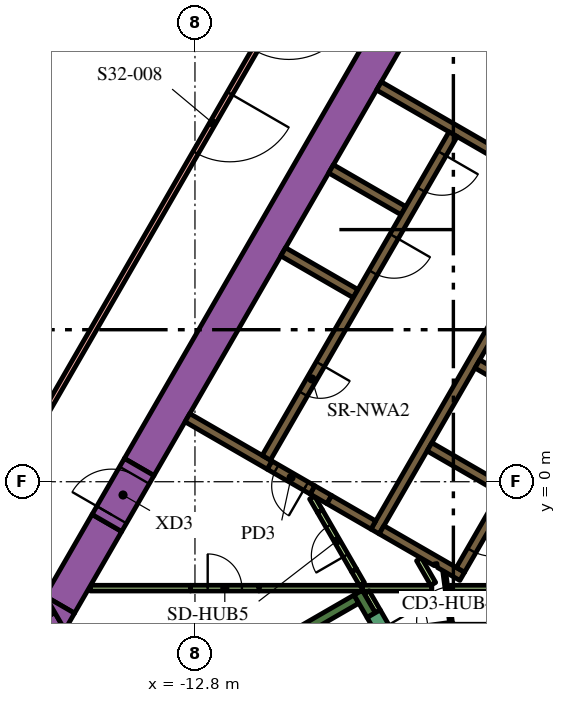
"""IFC4 building model, lengths in metres.
Left out: names, types, materials, properties, quantities, classifications, styles, units other than length and angle.
Written with IfcOpenShell. Run it as: python <this file> out.ifc"""

import sys

from ifc_helpers import new_model, si_unit, direction, frame, frame_2d, origin, place, context, subcontext, project, spatial, polyline, rectangle, outline, extrude, element, fill, save


model = new_model("IFC4")
c1 = context("Model", 3, precision=1e-05, world=origin(), true_north=direction((0.0, 1.0)))
c2 = subcontext(c1, "Body", "Model", "MODEL_VIEW")
j1 = project(units=[si_unit("LENGTHUNIT", "METRE"), si_unit("PLANEANGLEUNIT", "RADIAN")], contexts=[c1])
p1 = place(None, origin())
s1 = spatial("IfcSite", under=j1, at=p1, CompositionType="ELEMENT")
p2 = place(p1, origin())
s2 = spatial("IfcBuilding", under=s1, at=p2, CompositionType="ELEMENT")
p3 = place(p2, frame((0.0, 0.0, 134.4)))
s3 = spatial("IfcBuildingStorey", under=s2, at=p3, CompositionType="ELEMENT", Elevation=134.4)
p4 = place(p3, frame((-14.268, 0.387, 0.0), z_axis=(0.0, 0.0, 1.0), x_axis=(0.499994617707, 0.866028511231, 0.0)))
e1 = element("IfcWall", 1, at=p4, inside=s3, PredefinedType="SOLIDWALL", context=c2, shape_type="SweptSolid", body=[
    extrude(rectangle(XDim=18.817, YDim=0.9, at=frame_2d((9.409, 0.0))), origin(), (0.0, 0.0, 1.0), 7.2),
])
p5 = place(p3, frame((-12.134, -11.883, 0.0), z_axis=(0.0, 0.0, 1.0), x_axis=(-0.500005339912, 0.866022320763, 0.0)))
e2 = element("IfcWall", 2, at=p5, inside=s3, PredefinedType="SOLIDWALL", context=c2, shape_type="SweptSolid", body=[
    extrude(rectangle(XDim=9.488, YDim=0.9, at=frame_2d((4.744, 0.0))), origin(), (0.0, 0.0, 1.0), 7.2),
])
p6 = place(p3, origin())
e3 = element("IfcWall", 3, at=p6, inside=s3, PredefinedType="SOLIDWALL", context=c2, shape_type="SweptSolid", body=[
    extrude(outline(polyline([(-16.489, -3.44), (-17.251, -3.88), (-16.743, -3.0), (-16.489, -3.44)])), origin(), (0.0, 0.0, 1.0), 7.2),
])
p7 = place(p3, frame((-15.118, -1.085, 0.0), z_axis=(0.0, 0.0, 1.0), x_axis=(-0.50006606081, -0.865987260198, 0.0)))
e4 = element("IfcWall", 4, at=p7, inside=s3, PredefinedType="SOLIDWALL", context=c2, shape_type="SweptSolid", body=[
    extrude(rectangle(XDim=2.481, YDim=0.9, at=frame_2d((1.24, 0.0))), origin(), (0.0, 0.0, 1.0), 7.2),
])
e5 = element("IfcWall", 5, at=p6, inside=s3, PredefinedType="SOLIDWALL", context=c2, shape_type="SweptSolid", body=[
    extrude(outline(polyline([(-16.223, -3.9), (-16.732, -3.02), (-15.969, -3.46), (-16.223, -3.9)])), origin(), (0.0, 0.0, 1.0), 7.2),
])
p8 = place(p3, frame((-14.44, -6.49, 0.0), z_axis=(0.0, 0.0, 1.0), x_axis=(0.866022966069, 0.500004222222, 0.0)))
e6 = element("IfcWall", 6, at=p8, inside=s3, PredefinedType="SOLIDWALL", context=c2, shape_type="SweptSolid", body=[
    extrude(rectangle(XDim=6.8, YDim=0.25, at=frame_2d((3.4, 0.0))), origin(), (0.0, 0.0, 1.0), 7.2),
])
p9 = place(p3, frame((-8.163, -3.511, 0.0), z_axis=(0.0, 0.0, 1.0), x_axis=(-0.500206266495, 0.865906283012, 0.0)))
e7 = element("IfcWall", 7, at=p9, inside=s3, PredefinedType="SOLIDWALL", context=c2, shape_type="SweptSolid", body=[
    extrude(rectangle(XDim=0.684, YDim=0.25, at=frame_2d((0.342, 0.0))), origin(), (0.0, 0.0, 1.0), 7.2),
])
p10 = place(p3, frame((-8.06, -1.311, 0.0), z_axis=(0.0, 0.0, 1.0), x_axis=(0.50000273126, 0.866023826885, 0.0)))
e8 = element("IfcWall", 8, at=p10, inside=s3, PredefinedType="SOLIDWALL", context=c2, shape_type="SweptSolid", body=[
    extrude(rectangle(XDim=10.33, YDim=0.25, at=frame_2d((5.165, 0.0))), origin(), (0.0, 0.0, 1.0), 7.2),
])
for number, where, z_axis, x_axis in (
    (9, (-5.369, 3.1, 0.0), (0.0, 0.0, 1.0), (0.866, -0.5, 0.0)),
    (10, (-4.724, -0.182, 0.0), (0.0, 0.0, 1.0), (-0.866, 0.5, 0.0)),
):
    element("IfcWall", number, at=place(p3, frame(where, z_axis=z_axis, x_axis=x_axis)), inside=s3, PredefinedType="SOLIDWALL", context=c2, shape_type="SweptSolid", body=[
        extrude(rectangle(XDim=2.2, YDim=0.25, at=frame_2d((1.1, 0.0))), origin(), (0.0, 0.0, 1.0), 7.2),
    ])
e11 = element("IfcWall", 11, at=p6, inside=s3, PredefinedType="SOLIDWALL", context=c2, shape_type="SweptSolid", body=[
    extrude(outline(polyline([(-5.922, -2.257), (-5.922, -2.257), (-5.705, -2.382), (-5.83, -2.598), (-6.418, -2.258), (-6.433, -2.153), (-6.433, -2.153), (-6.433, -2.153), (-6.508, -2.163), (-6.508, -2.163), (-6.508, -2.163), (-6.501, -2.21), (-7.952, -1.373), (-7.827, -1.156), (-5.922, -2.257)])), origin(), (0.0, 0.0, 1.0), 7.2),
])
p11 = place(p3, frame((-9.708, -0.215, 0.0), z_axis=(0.0, 0.0, 1.0), x_axis=(0.866113839764, -0.499846793097, 0.0)))
e12 = element("IfcWall", 12, at=p11, inside=s3, PredefinedType="SOLIDWALL", context=c2, shape_type="SweptSolid", body=[
    extrude(rectangle(XDim=0.51, YDim=0.25, at=frame_2d((0.255, 0.0))), origin(), (0.0, 0.0, 1.0), 7.2),
])
p12 = place(p3, frame((-12.999, 1.685, 0.0), z_axis=(0.0, 0.0, 1.0), x_axis=(0.865996765544, -0.500049599607, 0.0)))
e13 = element("IfcWall", 13, at=p12, inside=s3, PredefinedType="SOLIDWALL", context=c2, shape_type="SweptSolid", body=[
    extrude(rectangle(XDim=2.498, YDim=0.25, at=frame_2d((1.249, 0.0))), origin(), (0.0, 0.0, 1.0), 7.2),
])
p13 = place(p3, frame((-9.265, -0.471, 0.0), z_axis=(0.0, 0.0, 1.0), x_axis=(0.865954634268, -0.500122556369, 0.0)))
e14 = element("IfcWall", 14, at=p13, inside=s3, PredefinedType="SOLIDWALL", context=c2, shape_type="SweptSolid", body=[
    extrude(rectangle(XDim=1.338, YDim=0.25, at=frame_2d((0.669, 0.0))), origin(), (0.0, 0.0, 1.0), 7.2),
])
for number, where, z_axis, x_axis in (
    (15, (-8.574, 4.95, 0.0), (0.0, 0.0, 1.0), (-0.866, 0.5, 0.0)),
    (16, (-7.314, 7.132, 0.0), (0.0, 0.0, 1.0), (-0.866, 0.5, 0.0)),
):
    element("IfcWall", number, at=place(p3, frame(where, z_axis=z_axis, x_axis=x_axis)), inside=s3, PredefinedType="SOLIDWALL", context=c2, shape_type="SweptSolid", body=[
        extrude(rectangle(XDim=2.2, YDim=0.25, at=frame_2d((1.1, 0.0))), origin(), (0.0, 0.0, 1.0), 7.2),
    ])
p14 = place(p3, frame((-7.959, 10.415, 0.0), z_axis=(0.0, 0.0, 1.0), x_axis=(0.866020958405, -0.500007699544, 0.0)))
e17 = element("IfcWall", 17, at=p14, inside=s3, PredefinedType="SOLIDWALL", context=c2, shape_type="SweptSolid", body=[
    extrude(rectangle(XDim=4.1, YDim=0.25, at=frame_2d((2.05, 0.0))), origin(), (0.0, 0.0, 1.0), 7.2),
])
p15 = place(p3, frame((-12.915, -2.8, 0.0), z_axis=(0.0, 0.0, 1.0), x_axis=(-1.0, 0.0, 0.0)))
e18 = element("IfcWall", 18, at=p15, inside=s3, PredefinedType="PARTITIONING", context=c2, shape_type="SweptSolid", body=[
    extrude(rectangle(XDim=2.637, YDim=0.15, at=frame_2d((1.318, 0.0))), origin(), (0.0, 0.0, 1.0), 6.15),
])
p16 = place(p3, frame((-8.395, -2.8, 0.0), z_axis=(0.0, 0.0, 1.0), x_axis=(1.0, 0.0, 0.0)))
e19 = element("IfcWall", 19, at=p16, inside=s3, PredefinedType="PARTITIONING", context=c2, shape_type="SweptSolid", body=[
    extrude(rectangle(XDim=1.828, YDim=0.15, at=frame_2d((0.914, 0.0))), origin(), (0.0, 0.0, 1.0), 6.15),
])
p17 = place(p3, frame((-11.115, -2.8, 0.0), z_axis=(0.0, 0.0, 1.0), x_axis=(1.0, 0.0, 0.0)))
e20 = element("IfcWall", 20, at=p17, inside=s3, PredefinedType="PARTITIONING", context=c2, shape_type="SweptSolid", body=[
    extrude(rectangle(XDim=2.708, YDim=0.15, at=frame_2d((1.354, 0.0))), origin(), (0.0, 0.0, 1.0), 6.15),
])
p18 = place(p3, frame((-6.531, -2.689, 0.0), z_axis=(0.0, 0.0, 1.0), x_axis=(-0.499967446111, 0.866044197965, 0.0)))
e21 = element("IfcWall", 21, at=p18, inside=s3, PredefinedType="PARTITIONING", context=c2, shape_type="SweptSolid", body=[
    extrude(rectangle(XDim=0.748, YDim=0.15, at=frame_2d((0.374, 0.0))), origin(), (0.0, 0.0, 1.0), 6.15),
])
p19 = place(p3, frame((-7.99, -3.412, 0.0), z_axis=(0.0, 0.0, 1.0), x_axis=(-0.500193841991, 0.86591346013, 0.0)))
e22 = element("IfcWall", 22, at=p19, inside=s3, PredefinedType="PARTITIONING", context=c2, shape_type="SweptSolid", body=[
    extrude(rectangle(XDim=0.583, YDim=0.15, at=frame_2d((0.292, 0.0))), origin(), (0.0, 0.0, 1.0), 6.15),
])
p20 = place(p3, frame((-8.612, -2.333, 0.0), z_axis=(0.0, 0.0, 1.0), x_axis=(0.500248216681, -0.86588204838, 0.0)))
e23 = element("IfcWall", 23, at=p20, inside=s3, PredefinedType="PARTITIONING", context=c2, shape_type="SweptSolid", body=[
    extrude(rectangle(XDim=0.415, YDim=0.15, at=frame_2d((0.208, 0.0))), origin(), (0.0, 0.0, 1.0), 6.15),
])
p21 = place(p3, frame((-6.086, -2.801, 0.0), z_axis=(0.0, 0.0, 1.0), x_axis=(1.0, 0.0, 0.0)))
e24 = element("IfcWall", 24, at=p21, inside=s3, PredefinedType="PARTITIONING", context=c2, shape_type="SweptSolid", body=[
    extrude(rectangle(XDim=7.524, YDim=0.15, at=frame_2d((3.762, 0.0))), origin(), (0.0, 0.0, 1.0), 6.15),
])
p22 = place(p3, frame((-9.512, -0.775, 0.0), z_axis=(0.0, 0.0, 1.0), x_axis=(-0.500080620599, 0.865978852456, 0.0)))
e25 = element("IfcWall", 25, at=p22, inside=s3, PredefinedType="PARTITIONING", context=c2, shape_type="SweptSolid", body=[
    extrude(rectangle(XDim=0.413, YDim=0.15, at=frame_2d((0.207, 0.0))), origin(), (0.0, 0.0, 1.0), 6.15),
])
p23 = place(p3, frame((-6.008, 9.144, 0.0), z_axis=(0.0, 0.0, 1.0), x_axis=(-0.500006956611, -0.866021387346, 0.0)))
e26 = element("IfcWall", 26, at=p23, inside=s3, PredefinedType="SOLIDWALL", context=c2, shape_type="SweptSolid", body=[
    extrude(rectangle(XDim=9.83, YDim=0.25, at=frame_2d((4.915, 0.0))), origin(), (0.0, 0.0, 1.0), 7.2),
])
p24 = place(p23, frame((0.585, 0.0, 0.0)))
e27 = element("IfcOpeningElement", 27, at=p24, cuts=e26, PredefinedType="OPENING", context=c2, shape_type="SweptSolid", body=[
    extrude(rectangle(XDim=1.1, YDim=2.1, at=frame_2d((0.55, 1.05))), frame((0.0, 0.135, 0.0), z_axis=(0.0, -1.0, 0.0), x_axis=(1.0, 0.0, 0.0)), (0.0, 0.0, 1.0), 0.27),
])
p25 = place(p23, frame((3.105, 0.0, 0.0)))
e28 = element("IfcOpeningElement", 28, at=p25, cuts=e26, PredefinedType="OPENING", context=c2, shape_type="SweptSolid", body=[
    extrude(rectangle(XDim=1.1, YDim=2.1, at=frame_2d((0.55, 1.05))), frame((0.0, 0.135, 0.0), z_axis=(0.0, -1.0, 0.0), x_axis=(1.0, 0.0, 0.0)), (0.0, 0.0, 1.0), 0.27),
])
p26 = place(p23, frame((6.985, 0.0, 0.0)))
e29 = element("IfcOpeningElement", 29, at=p26, cuts=e26, PredefinedType="OPENING", context=c2, shape_type="SweptSolid", body=[
    extrude(rectangle(XDim=0.9, YDim=2.1, at=frame_2d((0.45, 1.05))), frame((0.0, 0.135, 0.0), z_axis=(0.0, -1.0, 0.0), x_axis=(1.0, 0.0, 0.0)), (0.0, 0.0, 1.0), 0.27),
])
p27 = place(p3, frame((-0.898, 6.194, 0.0), z_axis=(0.0, 0.0, 1.0), x_axis=(-0.499996202215, -0.866027596426, 0.0)))
e30 = element("IfcWall", 30, at=p27, inside=s3, PredefinedType="SOLIDWALL", context=c2, shape_type="SweptSolid", body=[
    extrude(rectangle(XDim=9.83, YDim=0.25, at=frame_2d((4.915, 0.0))), origin(), (0.0, 0.0, 1.0), 7.2),
])
p28 = place(p27, frame((0.585, 0.0, 0.0)))
e31 = element("IfcOpeningElement", 31, at=p28, cuts=e30, PredefinedType="OPENING", context=c2, shape_type="SweptSolid", body=[
    extrude(rectangle(XDim=1.1, YDim=2.1, at=frame_2d((0.55, 1.05))), frame((0.0, 0.135, 0.0), z_axis=(0.0, -1.0, 0.0), x_axis=(1.0, 0.0, 0.0)), (0.0, 0.0, 1.0), 0.27),
])
p29 = place(p27, frame((3.105, 0.0, 0.0)))
e32 = element("IfcOpeningElement", 32, at=p29, cuts=e30, PredefinedType="OPENING", context=c2, shape_type="SweptSolid", body=[
    extrude(rectangle(XDim=1.1, YDim=2.1, at=frame_2d((0.55, 1.05))), frame((0.0, 0.135, 0.0), z_axis=(0.0, -1.0, 0.0), x_axis=(1.0, 0.0, 0.0)), (0.0, 0.0, 1.0), 0.27),
])
p30 = place(p27, frame((5.625, 0.0, 0.0)))
e33 = element("IfcOpeningElement", 33, at=p30, cuts=e30, PredefinedType="OPENING", context=c2, shape_type="SweptSolid", body=[
    extrude(rectangle(XDim=1.1, YDim=2.1, at=frame_2d((0.55, 1.05))), frame((0.0, 0.135, 0.0), z_axis=(0.0, -1.0, 0.0), x_axis=(1.0, 0.0, 0.0)), (0.0, 0.0, 1.0), 0.27),
])
p31 = place(p27, frame((8.145, 0.0, 0.0)))
e34 = element("IfcOpeningElement", 34, at=p31, cuts=e30, PredefinedType="OPENING", context=c2, shape_type="SweptSolid", body=[
    extrude(rectangle(XDim=1.1, YDim=2.1, at=frame_2d((0.55, 1.05))), frame((0.0, 0.135, 0.0), z_axis=(0.0, -1.0, 0.0), x_axis=(1.0, 0.0, 0.0)), (0.0, 0.0, 1.0), 0.27),
])
p32 = place(p3, frame((-8.098, -3.474, 0.0), z_axis=(0.0, 0.0, 1.0), x_axis=(0.49994051562, -0.866059744384, 0.0)))
e35 = element("IfcWall", 35, at=p32, inside=s3, PredefinedType="SOLIDWALL", context=c2, shape_type="SweptSolid", body=[
    extrude(rectangle(XDim=2.1, YDim=0.4, at=frame_2d((1.05, 0.0))), origin(), (0.0, 0.0, 1.0), 7.2),
])
p33 = place(p32, frame((0.45, 0.0, 0.0)))
e36 = element("IfcOpeningElement", 36, at=p33, cuts=e35, PredefinedType="OPENING", context=c2, shape_type="SweptSolid", body=[
    extrude(rectangle(XDim=1.2, YDim=2.1, at=frame_2d((0.6, 1.05))), frame((0.0, 0.21, 0.0), z_axis=(0.0, -1.0, 0.0), x_axis=(1.0, 0.0, 0.0)), (0.0, 0.0, 1.0), 0.42),
])
p34 = place(p3, frame((-9.708, -0.215, 0.0), z_axis=(0.0, 0.0, 1.0), x_axis=(-0.866004217611, 0.500036693733, 0.0)))
e37 = element("IfcWall", 37, at=p34, inside=s3, PredefinedType="SOLIDWALL", context=c2, shape_type="SweptSolid", body=[
    extrude(rectangle(XDim=1.3, YDim=0.25, at=frame_2d((0.65, 0.0))), origin(), (0.0, 0.0, 1.0), 7.2),
])
p35 = place(p34, frame((0.2, 0.0, 0.0)))
e38 = element("IfcOpeningElement", 38, at=p35, cuts=e37, PredefinedType="OPENING", context=c2, shape_type="SweptSolid", body=[
    extrude(rectangle(XDim=0.9, YDim=2.1, at=frame_2d((0.45, 1.05))), frame((0.0, 0.135, 0.0), z_axis=(0.0, -1.0, 0.0), x_axis=(1.0, 0.0, 0.0)), (0.0, 0.0, 1.0), 0.27),
])
p36 = place(p3, frame((-5.995, -4.213, 0.0), z_axis=(0.0, 0.0, 1.0), x_axis=(-0.132072335448, 0.991240081014, 0.0)))
e39 = element("IfcWall", 39, at=p36, inside=s3, PredefinedType="PARTITIONING", context=c2, shape_type="SweptSolid", body=[
    extrude(rectangle(XDim=2.1, YDim=0.076, at=frame_2d((1.05, 0.0))), origin(), (0.0, 0.0, 1.0), 6.15),
])
p37 = place(p36, frame((0.55, 0.0, 0.0)))
e40 = element("IfcOpeningElement", 40, at=p37, cuts=e39, PredefinedType="OPENING", context=c2, shape_type="SweptSolid", body=[
    extrude(rectangle(XDim=0.9, YDim=2.1, at=frame_2d((0.45, 1.05))), frame((0.0, 0.048, 0.0), z_axis=(0.0, -1.0, 0.0), x_axis=(1.0, 0.0, 0.0)), (0.0, 0.0, 1.0), 0.096),
])
p38 = place(p3, frame((-15.118, -1.085, 0.0), z_axis=(0.0, 0.0, 1.0), x_axis=(0.500000056704, 0.866025371046, 0.0)))
e41 = element("IfcWall", 41, at=p38, inside=s3, PredefinedType="SOLIDWALL", context=c2, shape_type="SweptSolid", body=[
    extrude(rectangle(XDim=1.7, YDim=0.9, at=frame_2d((0.85, 0.0))), origin(), (0.0, 0.0, 1.0), 7.2),
])
p39 = place(p38, frame((0.25, 0.0, 0.0)))
e42 = element("IfcOpeningElement", 42, at=p39, cuts=e41, PredefinedType="OPENING", context=c2, shape_type="SweptSolid", body=[
    extrude(rectangle(XDim=1.2, YDim=2.1, at=frame_2d((0.6, 1.05))), frame((0.0, 0.46, 0.0), z_axis=(0.0, -1.0, 0.0), x_axis=(1.0, 0.0, 0.0)), (0.0, 0.0, 1.0), 0.92),
])
p40 = place(p3, frame((-12.915, -2.8, 0.0), z_axis=(0.0, 0.0, 1.0), x_axis=(1.0, 0.0, 0.0)))
e43 = element("IfcWall", 43, at=p40, inside=s3, PredefinedType="PARTITIONING", context=c2, shape_type="SweptSolid", body=[
    extrude(rectangle(XDim=1.8, YDim=0.15, at=frame_2d((0.9, 0.0))), origin(), (0.0, 0.0, 1.0), 6.15),
])
p41 = place(p40, frame((0.45, 0.0, 0.0)))
e44 = element("IfcOpeningElement", 44, at=p41, cuts=e43, PredefinedType="OPENING", context=c2, shape_type="SweptSolid", body=[
    extrude(rectangle(XDim=0.9, YDim=2.1, at=frame_2d((0.45, 1.05))), frame((0.0, 0.085, 0.0), z_axis=(0.0, -1.0, 0.0), x_axis=(1.0, 0.0, 0.0)), (0.0, 0.0, 1.0), 0.17),
])
p42 = place(p3, frame((-8.612, -2.333, 0.0), z_axis=(0.0, 0.0, 1.0), x_axis=(-0.499961193289, 0.866047807691, 0.0)))
e45 = element("IfcWall", 45, at=p42, inside=s3, PredefinedType="PARTITIONING", context=c2, shape_type="SweptSolid", body=[
    extrude(rectangle(XDim=1.8, YDim=0.15, at=frame_2d((0.9, 0.0))), origin(), (0.0, 0.0, 1.0), 6.15),
])
p43 = place(p42, frame((0.45, 0.0, 0.0)))
e46 = element("IfcOpeningElement", 46, at=p43, cuts=e45, PredefinedType="OPENING", context=c2, shape_type="SweptSolid", body=[
    extrude(rectangle(XDim=0.9, YDim=2.1, at=frame_2d((0.45, 1.05))), frame((0.0, 0.085, 0.0), z_axis=(0.0, -1.0, 0.0), x_axis=(1.0, 0.0, 0.0)), (0.0, 0.0, 1.0), 0.17),
])
p44 = place(p3, frame((-6.639, 19.3, 0.0), z_axis=(0.0, 0.0, 1.0), x_axis=(-0.500001456469, -0.86602456289, 0.0)))
e47 = element("IfcWall", 47, at=p44, inside=s3, PredefinedType="PARTITIONING", context=c2, shape_type="SweptSolid", body=[
    extrude(rectangle(XDim=22.774, YDim=0.15, at=frame_2d((11.387, 0.0))), origin(), (0.0, 0.0, 1.0), 6.15),
])
p45 = place(p44, frame((10.487, 0.0, 0.0)))
e48 = element("IfcOpeningElement", 48, at=p45, cuts=e47, PredefinedType="OPENING", context=c2, shape_type="SweptSolid", body=[
    extrude(rectangle(XDim=1.8, YDim=2.1, at=frame_2d((0.9, 1.05))), frame((0.0, 0.085, 0.0), z_axis=(0.0, -1.0, 0.0), x_axis=(1.0, 0.0, 0.0)), (0.0, 0.0, 1.0), 0.17),
])
p46 = place(p44, frame((7.377, 0.0, 0.0)))
e49 = element("IfcOpeningElement", 49, at=p46, cuts=e47, PredefinedType="OPENING", context=c2, shape_type="SweptSolid", body=[
    extrude(rectangle(XDim=1.8, YDim=2.1, at=frame_2d((0.9, 1.05))), frame((0.0, 0.085, 0.0), z_axis=(0.0, -1.0, 0.0), x_axis=(1.0, 0.0, 0.0)), (0.0, 0.0, 1.0), 0.17),
])
p47 = place(p24, origin())
e50 = element("IfcDoor", 50, at=p47, inside=s3, OperationType="DOUBLE_DOOR_SLIDING", PredefinedType="DOOR", context=c2, shape_type="SweptSolid", body=[
    extrude(rectangle(XDim=1.1, YDim=2.1, at=frame_2d((0.55, 1.05))), frame((0.0, 0.025, 0.0), z_axis=(0.0, -1.0, 0.0), x_axis=(1.0, 0.0, 0.0)), (0.0, 0.0, 1.0), 0.05),
])
fill(e27, e50)
p48 = place(p25, origin())
e51 = element("IfcDoor", 51, at=p48, inside=s3, OperationType="DOUBLE_DOOR_SLIDING", PredefinedType="DOOR", context=c2, shape_type="SweptSolid", body=[
    extrude(rectangle(XDim=1.1, YDim=2.1, at=frame_2d((0.55, 1.05))), frame((0.0, 0.025, 0.0), z_axis=(0.0, -1.0, 0.0), x_axis=(1.0, 0.0, 0.0)), (0.0, 0.0, 1.0), 0.05),
])
fill(e28, e51)
p49 = place(p26, origin())
e52 = element("IfcDoor", 52, at=p49, inside=s3, OperationType="SINGLE_SWING_LEFT", PredefinedType="DOOR", context=c2, shape_type="SweptSolid", body=[
    extrude(rectangle(XDim=0.9, YDim=2.1, at=frame_2d((0.45, 1.05))), frame((0.0, 0.025, 0.0), z_axis=(0.0, -1.0, 0.0), x_axis=(1.0, 0.0, 0.0)), (0.0, 0.0, 1.0), 0.05),
])
fill(e29, e52)
p50 = place(p31, origin())
e53 = element("IfcDoor", 53, at=p50, inside=s3, OperationType="DOUBLE_DOOR_SLIDING", PredefinedType="DOOR", context=c2, shape_type="SweptSolid", body=[
    extrude(rectangle(XDim=1.1, YDim=2.1, at=frame_2d((0.55, 1.05))), frame((0.0, 0.025, 0.0), z_axis=(0.0, -1.0, 0.0), x_axis=(1.0, 0.0, 0.0)), (0.0, 0.0, 1.0), 0.05),
])
fill(e34, e53)
p51 = place(p35, origin())
e54 = element("IfcDoor", 54, at=p51, inside=s3, OperationType="SINGLE_SWING_LEFT", PredefinedType="DOOR", context=c2, shape_type="SweptSolid", body=[
    extrude(rectangle(XDim=0.9, YDim=2.1, at=frame_2d((0.45, 1.05))), frame((0.0, 0.025, 0.0), z_axis=(0.0, -1.0, 0.0), x_axis=(1.0, 0.0, 0.0)), (0.0, 0.0, 1.0), 0.05),
])
fill(e38, e54)
p52 = place(p37, origin())
e55 = element("IfcDoor", 55, at=p52, inside=s3, OperationType="SINGLE_SWING_LEFT", PredefinedType="DOOR", context=c2, shape_type="SweptSolid", body=[
    extrude(rectangle(XDim=0.9, YDim=2.1, at=frame_2d((0.45, 1.05))), frame((0.0, 0.025, 0.0), z_axis=(0.0, -1.0, 0.0), x_axis=(1.0, 0.0, 0.0)), (0.0, 0.0, 1.0), 0.05),
])
fill(e40, e55)
p53 = place(p39, origin())
e56 = element("IfcDoor", 56, at=p53, inside=s3, OperationType="SINGLE_SWING_LEFT", PredefinedType="DOOR", context=c2, shape_type="SweptSolid", body=[
    extrude(rectangle(XDim=1.2, YDim=2.1, at=frame_2d((0.6, 1.05))), frame((0.0, 0.025, 0.0), z_axis=(0.0, -1.0, 0.0), x_axis=(1.0, 0.0, 0.0)), (0.0, 0.0, 1.0), 0.05),
])
fill(e42, e56)
p54 = place(p41, origin())
e57 = element("IfcDoor", 57, at=p54, inside=s3, OperationType="SINGLE_SWING_LEFT", PredefinedType="DOOR", context=c2, shape_type="SweptSolid", body=[
    extrude(rectangle(XDim=0.9, YDim=2.1, at=frame_2d((0.45, 1.05))), frame((0.0, 0.025, 0.0), z_axis=(0.0, -1.0, 0.0), x_axis=(1.0, 0.0, 0.0)), (0.0, 0.0, 1.0), 0.05),
])
fill(e44, e57)
p55 = place(p43, origin())
e58 = element("IfcDoor", 58, at=p55, inside=s3, OperationType="SINGLE_SWING_LEFT", PredefinedType="DOOR", context=c2, shape_type="SweptSolid", body=[
    extrude(rectangle(XDim=0.9, YDim=2.1, at=frame_2d((0.45, 1.05))), frame((0.0, 0.025, 0.0), z_axis=(0.0, -1.0, 0.0), x_axis=(1.0, 0.0, 0.0)), (0.0, 0.0, 1.0), 0.05),
])
fill(e46, e58)
p56 = place(p45, origin())
e59 = element("IfcDoor", 59, at=p56, inside=s3, OperationType="DOUBLE_DOOR_SINGLE_SWING", PredefinedType="DOOR", context=c2, shape_type="SweptSolid", body=[
    extrude(rectangle(XDim=1.8, YDim=2.1, at=frame_2d((0.9, 1.05))), frame((0.0, 0.025, 0.0), z_axis=(0.0, -1.0, 0.0), x_axis=(1.0, 0.0, 0.0)), (0.0, 0.0, 1.0), 0.05),
])
fill(e48, e59)
save(model, sys.argv[1])
